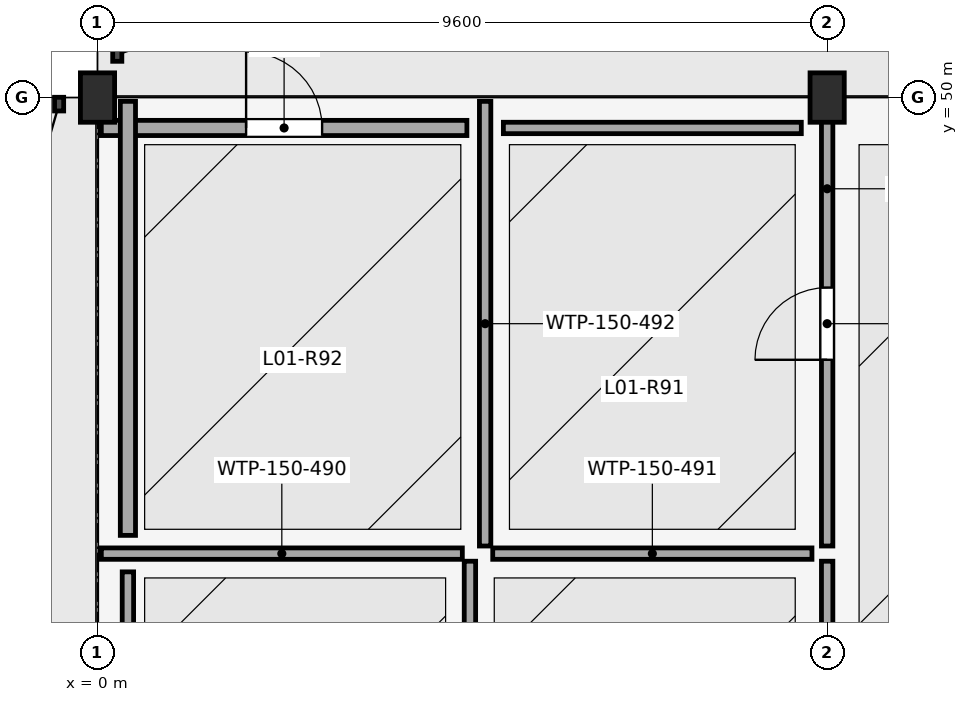
"""IFC4 building model, lengths in metres.
Left out: names, types, materials, properties, quantities, classifications, styles, units other than length and angle.
Written with IfcOpenShell. Run it as: python <this file> out.ifc"""

import sys

from ifc_helpers import new_model, si_unit, direction, frame, frame_2d, origin, origin_2d, place, context, subcontext, project, spatial, rectangle, extrude, element, fill, save


model = new_model("IFC4")
c1 = context("Model", 3, precision=1e-05, world=origin(), true_north=direction((0.0, 1.0)))
c2 = subcontext(c1, "Body", "Model", "MODEL_VIEW")
j1 = project(units=[si_unit("LENGTHUNIT", "METRE"), si_unit("PLANEANGLEUNIT", "RADIAN")], contexts=[c1])
p1 = place(None, origin())
s1 = spatial("IfcSite", under=j1, at=p1, CompositionType="ELEMENT")
p2 = place(p1, origin())
s2 = spatial("IfcBuilding", under=s1, at=p2, CompositionType="ELEMENT")
p3 = place(p2, frame((0.0, 0.0, 4.8)))
s3 = spatial("IfcBuildingStorey", under=s2, at=p3, CompositionType="ELEMENT", Elevation=4.8)
for number, where, z_axis, x_axis in (
    (1, (0.0, 50.0, 0.0), (0.0, 0.0, 1.0), (1.0, 0.0, 0.0)),
    (2, (9.6, 50.0, 0.0), (0.0, 0.0, 1.0), (1.0, 0.0, 0.0)),
):
    element("IfcColumn", number, at=place(p3, frame(where, z_axis=z_axis, x_axis=x_axis)), inside=s3, PredefinedType="COLUMN", context=c2, shape_type="SweptSolid", body=[
        extrude(rectangle(XDim=0.45, YDim=0.65, at=origin_2d()), origin(), (0.0, 0.0, 1.0), 4.8),
    ])
p4 = place(p3, frame((9.6, 38.5, 0.0), z_axis=(0.0, 0.0, 1.0), x_axis=(0.0, 1.0, 0.0)))
e3 = element("IfcWall", 3, at=p4, inside=s3, PredefinedType="PARTITIONING", context=c2, shape_type="SweptSolid", body=[
    extrude(rectangle(XDim=5.4, YDim=0.15, at=frame_2d((2.7, 0.0))), origin(), (0.0, 0.0, 1.0), 4.076),
])
p5 = place(p4, frame((0.549, 0.0, 0.0)))
e4 = element("IfcOpeningElement", 4, at=p5, cuts=e3, PredefinedType="OPENING", context=c2, shape_type="SweptSolid", body=[
    extrude(rectangle(XDim=0.9, YDim=2.15, at=frame_2d((0.45, 1.075))), frame((0.0, 0.085, 0.0), z_axis=(0.0, -1.0, 0.0), x_axis=(1.0, 0.0, 0.0)), (0.0, 0.0, 1.0), 0.17),
])
p6 = place(p3, frame((9.6, 44.1, 0.0), z_axis=(0.0, 0.0, 1.0), x_axis=(0.0, 1.0, 0.0)))
e5 = element("IfcWall", 5, at=p6, inside=s3, PredefinedType="PARTITIONING", context=c2, shape_type="SweptSolid", body=[
    extrude(rectangle(XDim=5.85, YDim=0.15, at=frame_2d((2.925, 0.0))), origin(), (0.0, 0.0, 1.0), 4.076),
])
p7 = place(p6, frame((2.45, 0.0, 0.0)))
e6 = element("IfcOpeningElement", 6, at=p7, cuts=e5, PredefinedType="OPENING", context=c2, shape_type="SweptSolid", body=[
    extrude(rectangle(XDim=0.95, YDim=2.15, at=frame_2d((0.475, 1.075))), frame((0.0, 0.085, 0.0), z_axis=(0.0, -1.0, 0.0), x_axis=(1.0, 0.0, 0.0)), (0.0, 0.0, 1.0), 0.17),
])
p8 = place(p3, frame((4.9, 38.5, 0.0), z_axis=(0.0, 0.0, 1.0), x_axis=(0.0, 1.0, 0.0)))
e7 = element("IfcWall", 7, at=p8, inside=s3, PredefinedType="PARTITIONING", context=c2, shape_type="SweptSolid", body=[
    extrude(rectangle(XDim=5.4, YDim=0.15, at=frame_2d((2.7, 0.0))), origin(), (0.0, 0.0, 1.0), 4.42),
])
p9 = place(p3, frame((0.05, 44.0, 0.0), z_axis=(0.0, 0.0, 1.0), x_axis=(1.0, 0.0, 0.0)))
e8 = element("IfcWall", 8, at=p9, inside=s3, PredefinedType="PARTITIONING", context=c2, shape_type="SweptSolid", body=[
    extrude(rectangle(XDim=4.75, YDim=0.15, at=frame_2d((2.375, 0.0))), origin(), (0.0, 0.0, 1.0), 4.42),
])
p10 = place(p3, frame((5.2, 44.0, 0.0), z_axis=(0.0, 0.0, 1.0), x_axis=(1.0, 0.0, 0.0)))
e9 = element("IfcWall", 9, at=p10, inside=s3, PredefinedType="PARTITIONING", context=c2, shape_type="SweptSolid", body=[
    extrude(rectangle(XDim=4.2, YDim=0.15, at=frame_2d((2.1, 0.0))), origin(), (0.0, 0.0, 1.0), 4.42),
])
p11 = place(p3, frame((5.1, 44.1, 0.0), z_axis=(0.0, 0.0, 1.0), x_axis=(0.0, 1.0, 0.0)))
e10 = element("IfcWall", 10, at=p11, inside=s3, PredefinedType="PARTITIONING", context=c2, shape_type="SweptSolid", body=[
    extrude(rectangle(XDim=5.85, YDim=0.15, at=frame_2d((2.925, 0.0))), origin(), (0.0, 0.0, 1.0), 4.42),
])
p12 = place(p3, frame((0.4, 38.64, 0.0), z_axis=(0.0, 0.0, 1.0), x_axis=(0.0, 1.0, 0.0)))
e11 = element("IfcWall", 11, at=p12, inside=s3, PredefinedType="PARTITIONING", context=c2, shape_type="SweptSolid", body=[
    extrude(rectangle(XDim=5.12, YDim=0.15, at=frame_2d((2.56, 0.0))), origin(), (0.0, 0.0, 1.0), 4.42),
])
p13 = place(p12, frame((0.36, 0.0, 0.0)))
e12 = element("IfcOpeningElement", 12, at=p13, cuts=e11, PredefinedType="OPENING", context=c2, shape_type="SweptSolid", body=[
    extrude(rectangle(XDim=0.9, YDim=2.15, at=frame_2d((0.45, 1.075))), frame((0.0, 0.085, 0.0), z_axis=(0.0, -1.0, 0.0), x_axis=(1.0, 0.0, 0.0)), (0.0, 0.0, 1.0), 0.17),
])
p14 = place(p3, frame((5.34, 49.6, 0.0), z_axis=(0.0, 0.0, 1.0), x_axis=(1.0, 0.0, 0.0)))
e13 = element("IfcWall", 13, at=p14, inside=s3, PredefinedType="PARTITIONING", context=c2, shape_type="SweptSolid", body=[
    extrude(rectangle(XDim=3.92, YDim=0.15, at=frame_2d((1.96, 0.0))), origin(), (0.0, 0.0, 1.0), 4.42),
])
p15 = place(p3, frame((0.05, 49.6, 0.0), z_axis=(0.0, 0.0, 1.0), x_axis=(1.0, 0.0, 0.0)))
e14 = element("IfcWall", 14, at=p15, inside=s3, PredefinedType="PARTITIONING", context=c2, shape_type="SweptSolid", body=[
    extrude(rectangle(XDim=4.81, YDim=0.2, at=frame_2d((2.405, 0.0))), origin(), (0.0, 0.0, 1.0), 4.42),
])
p16 = place(p15, frame((1.905, 0.0, 0.0)))
e15 = element("IfcOpeningElement", 15, at=p16, cuts=e14, PredefinedType="OPENING", context=c2, shape_type="SweptSolid", body=[
    extrude(rectangle(XDim=1.0, YDim=2.15, at=frame_2d((0.5, 1.075))), frame((0.0, 0.11, 0.0), z_axis=(0.0, -1.0, 0.0), x_axis=(1.0, 0.0, 0.0)), (0.0, 0.0, 1.0), 0.22),
])
p17 = place(p3, frame((0.4, 44.24, 0.0), z_axis=(0.0, 0.0, 1.0), x_axis=(0.0, 1.0, 0.0)))
e16 = element("IfcWall", 16, at=p17, inside=s3, PredefinedType="PARTITIONING", context=c2, shape_type="SweptSolid", body=[
    extrude(rectangle(XDim=5.71, YDim=0.2, at=frame_2d((2.855, 0.0))), origin(), (0.0, 0.0, 1.0), 4.42),
])
p18 = place(p7, origin())
e17 = element("IfcDoor", 17, at=p18, inside=s3, OperationType="SINGLE_SWING_LEFT", PredefinedType="DOOR", context=c2, shape_type="SweptSolid", body=[
    extrude(rectangle(XDim=0.95, YDim=2.15, at=frame_2d((0.475, 1.075))), frame((0.0, 0.025, 0.0), z_axis=(0.0, -1.0, 0.0), x_axis=(1.0, 0.0, 0.0)), (0.0, 0.0, 1.0), 0.05),
])
fill(e6, e17)
p19 = place(p16, origin())
e18 = element("IfcDoor", 18, at=p19, inside=s3, OperationType="SINGLE_SWING_LEFT", PredefinedType="DOOR", context=c2, shape_type="SweptSolid", body=[
    extrude(rectangle(XDim=1.0, YDim=2.15, at=frame_2d((0.5, 1.075))), frame((0.0, 0.025, 0.0), z_axis=(0.0, -1.0, 0.0), x_axis=(1.0, 0.0, 0.0)), (0.0, 0.0, 1.0), 0.05),
])
fill(e15, e18)
save(model, sys.argv[1])
